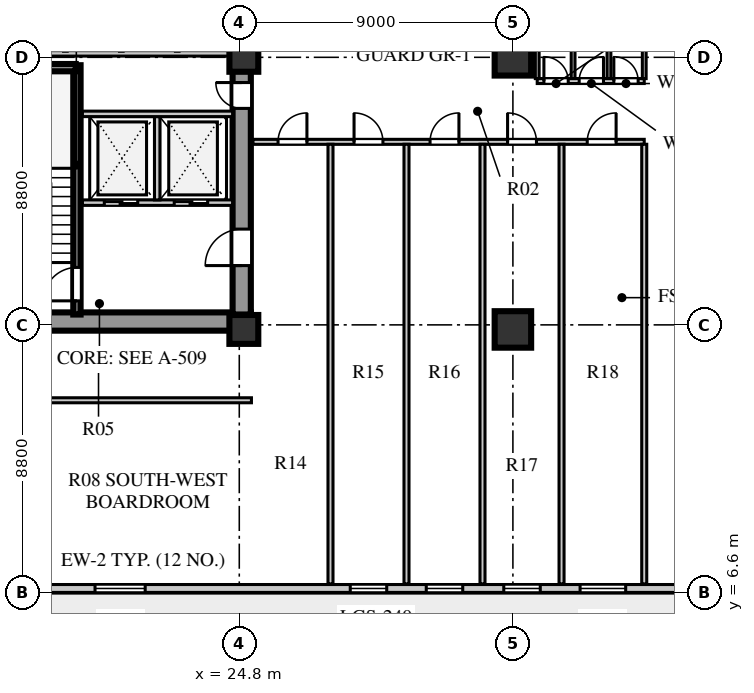
"""IFC4 building model, lengths in metres.
Left out: names, types, materials, properties, quantities, classifications, styles, units other than length and angle.
Written with IfcOpenShell. Run it as: python <this file> out.ifc"""

import sys

from ifc_helpers import new_model, si_unit, direction, frame, frame_2d, origin, origin_2d, place, context, subcontext, project, spatial, rectangle, extrude, element, fill, save


model = new_model("IFC4")
c1 = context("Model", 3, precision=1e-05, world=origin(), true_north=direction((0.0, 1.0)))
c2 = subcontext(c1, "Body", "Model", "MODEL_VIEW")
j1 = project(units=[si_unit("LENGTHUNIT", "METRE"), si_unit("PLANEANGLEUNIT", "RADIAN")], contexts=[c1])
p1 = place(None, origin())
s1 = spatial("IfcSite", under=j1, at=p1, CompositionType="ELEMENT")
p2 = place(p1, origin())
s2 = spatial("IfcBuilding", under=s1, at=p2, CompositionType="ELEMENT")
p3 = place(p2, frame((0.0, 0.0, 66.0)))
s3 = spatial("IfcBuildingStorey", under=s2, at=p3, CompositionType="ELEMENT", Elevation=66.0)
p4 = place(p3, frame((15.3, 15.51, 0.0), z_axis=(0.0, 0.0, 1.0), x_axis=(1.0, 0.0, 0.0)))
e1 = element("IfcWall", 1, at=p4, inside=s3, PredefinedType="SHEAR", context=c2, shape_type="SweptSolid", body=[
    extrude(rectangle(XDim=9.88, YDim=0.6, at=frame_2d((4.94, 0.0))), origin(), (0.0, 0.0, 1.0), 3.72),
])
p5 = place(p3, frame((24.88, 15.74, 0.0), z_axis=(0.0, 0.0, 1.0), x_axis=(0.0, 1.0, 0.0)))
e2 = element("IfcWall", 2, at=p5, inside=s3, PredefinedType="SHEAR", context=c2, shape_type="SweptSolid", body=[
    extrude(rectangle(XDim=25.76, YDim=0.6, at=frame_2d((12.88, 0.0))), origin(), (0.0, 0.0, 1.0), 3.72),
])
p6 = place(p5, frame((1.61, 0.0, 0.0)))
e3 = element("IfcOpeningElement", 3, at=p6, cuts=e2, PredefinedType="OPENING", context=c2, shape_type="SweptSolid", body=[
    extrude(rectangle(XDim=1.2, YDim=2.1, at=frame_2d((0.6, 1.05))), frame((0.0, 0.31, 0.0), z_axis=(0.0, -1.0, 0.0), x_axis=(1.0, 0.0, 0.0)), (0.0, 0.0, 1.0), 0.62),
])
p7 = place(p5, frame((6.78, 0.0, 0.0)))
e4 = element("IfcOpeningElement", 4, at=p7, cuts=e2, PredefinedType="OPENING", context=c2, shape_type="SweptSolid", body=[
    extrude(rectangle(XDim=0.85, YDim=2.06, at=frame_2d((0.425, 1.03))), frame((0.0, 0.31, 0.0), z_axis=(0.0, -1.0, 0.0), x_axis=(1.0, 0.0, 0.0)), (0.0, 0.0, 1.0), 0.62),
])
p8 = place(p5, frame((12.11, 0.0, 0.0)))
e5 = element("IfcOpeningElement", 5, at=p8, cuts=e2, PredefinedType="OPENING", context=c2, shape_type="SweptSolid", body=[
    extrude(rectangle(XDim=1.5, YDim=2.12, at=frame_2d((0.75, 1.06))), frame((0.0, 0.31, 0.0), z_axis=(0.0, -1.0, 0.0), x_axis=(1.0, 0.0, 0.0)), (0.0, 0.0, 1.0), 0.62),
])
p9 = place(p5, frame((20.11, 0.0, 0.0)))
e6 = element("IfcOpeningElement", 6, at=p9, cuts=e2, PredefinedType="OPENING", context=c2, shape_type="SweptSolid", body=[
    extrude(rectangle(XDim=1.2, YDim=2.12, at=frame_2d((0.6, 1.06))), frame((0.0, 0.31, 0.0), z_axis=(0.0, -1.0, 0.0), x_axis=(1.0, 0.0, 0.0)), (0.0, 0.0, 1.0), 0.62),
])
p10 = place(p5, frame((24.01, 0.0, 0.0)))
e7 = element("IfcOpeningElement", 7, at=p10, cuts=e2, PredefinedType="OPENING", context=c2, shape_type="SweptSolid", body=[
    extrude(rectangle(XDim=0.95, YDim=2.1, at=frame_2d((0.475, 1.05))), frame((0.0, 0.31, 0.0), z_axis=(0.0, -1.0, 0.0), x_axis=(1.0, 0.0, 0.0)), (0.0, 0.0, 1.0), 0.62),
])
for number, where, z_axis, x_axis in (
    (8, (24.95, 15.25, 0.0), (0.0, 0.0, 1.0), (1.0, 0.0, 0.0)),
    (9, (24.95, 24.2, 0.0), (0.0, 0.0, 1.0), (1.0, 0.0, 0.0)),
):
    element("IfcColumn", number, at=place(p3, frame(where, z_axis=z_axis, x_axis=x_axis)), inside=s3, PredefinedType="COLUMN", context=c2, shape_type="SweptSolid", body=[
        extrude(rectangle(XDim=0.95, YDim=0.95, at=origin_2d()), origin(), (0.0, 0.0, 1.0), 3.72),
    ])
for number, where, z_axis, x_axis in (
    (10, (33.8, 15.25, 0.0), (0.0, 0.0, 1.0), (1.0, 0.0, 0.0)),
    (11, (33.8, 24.2, 0.0), (0.0, 0.0, 1.0), (1.0, 0.0, 0.0)),
):
    element("IfcColumn", number, at=place(p3, frame(where, z_axis=z_axis, x_axis=x_axis)), inside=s3, PredefinedType="COLUMN", context=c2, shape_type="SweptSolid", body=[
        extrude(rectangle(XDim=1.2, YDim=1.2, at=origin_2d()), origin(), (0.0, 0.0, 1.0), 3.72),
    ])
p11 = place(p3, frame((12.3, 6.73, 0.0), z_axis=(0.0, 0.0, 1.0), x_axis=(1.0, 0.0, 0.0)))
e12 = element("IfcWall", 12, at=p11, inside=s3, PredefinedType="SOLIDWALL", context=c2, shape_type="SweptSolid", body=[
    extrude(rectangle(XDim=34.0, YDim=0.26, at=frame_2d((17.0, 0.0))), origin(), (0.0, 0.0, 1.0), 3.72),
])
p12 = place(p11, frame((0.95, 0.0, 0.0)))
e13 = element("IfcOpeningElement", 13, at=p12, cuts=e12, PredefinedType="OPENING", context=c2, shape_type="SweptSolid", body=[
    extrude(rectangle(XDim=1.0, YDim=2.05, at=frame_2d((0.5, 1.025))), frame((0.0, 0.14, 0.0), z_axis=(0.0, -1.0, 0.0), x_axis=(1.0, 0.0, 0.0)), (0.0, 0.0, 1.0), 0.28),
])
p13 = place(p11, frame((7.755, 0.0, 0.8)))
e14 = element("IfcOpeningElement", 14, at=p13, cuts=e12, PredefinedType="OPENING", context=c2, shape_type="SweptSolid", body=[
    extrude(rectangle(XDim=1.65, YDim=1.95, at=frame_2d((0.825, 0.975))), frame((0.0, 0.14, 0.0), z_axis=(0.0, -1.0, 0.0), x_axis=(1.0, 0.0, 0.0)), (0.0, 0.0, 1.0), 0.28),
])
p14 = place(p11, frame((16.15, 0.0, 0.8)))
e15 = element("IfcOpeningElement", 15, at=p14, cuts=e12, PredefinedType="OPENING", context=c2, shape_type="SweptSolid", body=[
    extrude(rectangle(XDim=1.2, YDim=1.75, at=frame_2d((0.6, 0.875))), frame((0.0, 0.14, 0.0), z_axis=(0.0, -1.0, 0.0), x_axis=(1.0, 0.0, 0.0)), (0.0, 0.0, 1.0), 0.28),
])
p15 = place(p11, frame((18.65, 0.0, 0.8)))
e16 = element("IfcOpeningElement", 16, at=p15, cuts=e12, PredefinedType="OPENING", context=c2, shape_type="SweptSolid", body=[
    extrude(rectangle(XDim=1.2, YDim=1.75, at=frame_2d((0.6, 0.875))), frame((0.0, 0.14, 0.0), z_axis=(0.0, -1.0, 0.0), x_axis=(1.0, 0.0, 0.0)), (0.0, 0.0, 1.0), 0.28),
])
p16 = place(p11, frame((21.2, 0.0, 0.8)))
e17 = element("IfcOpeningElement", 17, at=p16, cuts=e12, PredefinedType="OPENING", context=c2, shape_type="SweptSolid", body=[
    extrude(rectangle(XDim=1.2, YDim=1.75, at=frame_2d((0.6, 0.875))), frame((0.0, 0.14, 0.0), z_axis=(0.0, -1.0, 0.0), x_axis=(1.0, 0.0, 0.0)), (0.0, 0.0, 1.0), 0.28),
])
p17 = place(p11, frame((23.71, 0.0, 0.8)))
e18 = element("IfcOpeningElement", 18, at=p17, cuts=e12, PredefinedType="OPENING", context=c2, shape_type="SweptSolid", body=[
    extrude(rectangle(XDim=1.5, YDim=2.0, at=frame_2d((0.75, 1.0))), frame((0.0, 0.14, 0.0), z_axis=(0.0, -1.0, 0.0), x_axis=(1.0, 0.0, 0.0)), (0.0, 0.0, 1.0), 0.28),
])
p18 = place(p11, frame((29.255, 0.0, 0.8)))
e19 = element("IfcOpeningElement", 19, at=p18, cuts=e12, PredefinedType="OPENING", context=c2, shape_type="SweptSolid", body=[
    extrude(rectangle(XDim=1.2, YDim=1.75, at=frame_2d((0.6, 0.875))), frame((0.0, 0.14, 0.0), z_axis=(0.0, -1.0, 0.0), x_axis=(1.0, 0.0, 0.0)), (0.0, 0.0, 1.0), 0.28),
])
p19 = place(p3, frame((19.46, 15.74, 0.0), z_axis=(0.0, 0.0, 1.0), x_axis=(0.0, 1.0, 0.0)))
e20 = element("IfcWall", 20, at=p19, inside=s3, PredefinedType="SHEAR", context=c2, shape_type="SweptSolid", body=[
    extrude(rectangle(XDim=8.2, YDim=0.24, at=frame_2d((4.1, 0.0))), origin(), (0.0, 0.0, 1.0), 4.0),
])
p20 = place(p19, frame((0.45, 0.0, 0.0)))
e21 = element("IfcOpeningElement", 21, at=p20, cuts=e20, PredefinedType="OPENING", context=c2, shape_type="SweptSolid", body=[
    extrude(rectangle(XDim=1.1, YDim=2.1, at=frame_2d((0.55, 1.05))), frame((0.0, 0.13, 0.0), z_axis=(0.0, -1.0, 0.0), x_axis=(1.0, 0.0, 0.0)), (0.0, 0.0, 1.0), 0.26),
])
p21 = place(p3, frame((15.9, 23.86, 0.0), z_axis=(0.0, 0.0, 1.0), x_axis=(1.0, 0.0, 0.0)))
e22 = element("IfcWall", 22, at=p21, inside=s3, PredefinedType="SHEAR", context=c2, shape_type="SweptSolid", body=[
    extrude(rectangle(XDim=3.52, YDim=0.24, at=frame_2d((1.76, 0.0))), origin(), (0.0, 0.0, 1.0), 4.0),
])
p22 = place(p3, frame((19.64, 19.42, 0.0), z_axis=(0.0, 0.0, 1.0), x_axis=(1.0, 0.0, 0.0)))
e23 = element("IfcWall", 23, at=p22, inside=s3, PredefinedType="SOLIDWALL", context=c2, shape_type="SweptSolid", body=[
    extrude(rectangle(XDim=4.94, YDim=0.18, at=frame_2d((2.47, 0.0))), origin(), (0.0, 0.0, 1.0), 3.72),
])
p23 = place(p22, frame((0.72, 0.0, 0.0)))
e24 = element("IfcOpeningElement", 24, at=p23, cuts=e23, PredefinedType="OPENING", context=c2, shape_type="SweptSolid", body=[
    extrude(rectangle(XDim=1.1, YDim=2.1, at=frame_2d((0.55, 1.05))), frame((0.0, 0.1, 0.0), z_axis=(0.0, -1.0, 0.0), x_axis=(1.0, 0.0, 0.0)), (0.0, 0.0, 1.0), 0.2),
])
p24 = place(p22, frame((3.02, 0.0, 0.0)))
e25 = element("IfcOpeningElement", 25, at=p24, cuts=e23, PredefinedType="OPENING", context=c2, shape_type="SweptSolid", body=[
    extrude(rectangle(XDim=1.1, YDim=2.1, at=frame_2d((0.55, 1.05))), frame((0.0, 0.1, 0.0), z_axis=(0.0, -1.0, 0.0), x_axis=(1.0, 0.0, 0.0)), (0.0, 0.0, 1.0), 0.2),
])
p25 = place(p3, frame((22.1, 19.51, 0.0), z_axis=(0.0, 0.0, 1.0), x_axis=(0.0, 1.0, 0.0)))
e26 = element("IfcWall", 26, at=p25, inside=s3, PredefinedType="SOLIDWALL", context=c2, shape_type="SweptSolid", body=[
    extrude(rectangle(XDim=2.74, YDim=0.18, at=frame_2d((1.37, 0.0))), origin(), (0.0, 0.0, 1.0), 3.72),
])
p26 = place(p3, frame((19.64, 22.34, 0.0), z_axis=(0.0, 0.0, 1.0), x_axis=(1.0, 0.0, 0.0)))
e27 = element("IfcWall", 27, at=p26, inside=s3, PredefinedType="SOLIDWALL", context=c2, shape_type="SweptSolid", body=[
    extrude(rectangle(XDim=4.94, YDim=0.18, at=frame_2d((2.47, 0.0))), origin(), (0.0, 0.0, 1.0), 3.72),
])
p27 = place(p3, frame((15.9, 24.33, 0.0), z_axis=(0.0, 0.0, 1.0), x_axis=(1.0, 0.0, 0.0)))
e28 = element("IfcWall", 28, at=p27, inside=s3, PredefinedType="SOLIDWALL", context=c2, shape_type="SweptSolid", body=[
    extrude(rectangle(XDim=8.68, YDim=0.18, at=frame_2d((4.34, 0.0))), origin(), (0.0, 0.0, 1.0), 3.02),
])
p28 = place(p3, frame((25.25, 21.42, 0.0), z_axis=(0.0, 0.0, 1.0), x_axis=(1.0, 0.0, 0.0)))
e29 = element("IfcWall", 29, at=p28, inside=s3, PredefinedType="PARTITIONING", context=c2, shape_type="SweptSolid", body=[
    extrude(rectangle(XDim=12.87, YDim=0.165, at=frame_2d((6.435, 0.0))), origin(), (0.0, 0.0, 1.0), 3.32),
])
p29 = place(p28, frame((0.825, 0.0, 0.0)))
e30 = element("IfcOpeningElement", 30, at=p29, cuts=e29, PredefinedType="OPENING", context=c2, shape_type="SweptSolid", body=[
    extrude(rectangle(XDim=0.95, YDim=2.08, at=frame_2d((0.475, 1.04))), frame((0.0, 0.093, 0.0), z_axis=(0.0, -1.0, 0.0), x_axis=(1.0, 0.0, 0.0)), (0.0, 0.0, 1.0), 0.185),
])
p30 = place(p28, frame((3.325, 0.0, 0.0)))
e31 = element("IfcOpeningElement", 31, at=p30, cuts=e29, PredefinedType="OPENING", context=c2, shape_type="SweptSolid", body=[
    extrude(rectangle(XDim=0.95, YDim=2.08, at=frame_2d((0.475, 1.04))), frame((0.0, 0.093, 0.0), z_axis=(0.0, -1.0, 0.0), x_axis=(1.0, 0.0, 0.0)), (0.0, 0.0, 1.0), 0.185),
])
p31 = place(p28, frame((5.825, 0.0, 0.0)))
e32 = element("IfcOpeningElement", 32, at=p31, cuts=e29, PredefinedType="OPENING", context=c2, shape_type="SweptSolid", body=[
    extrude(rectangle(XDim=0.95, YDim=2.08, at=frame_2d((0.475, 1.04))), frame((0.0, 0.093, 0.0), z_axis=(0.0, -1.0, 0.0), x_axis=(1.0, 0.0, 0.0)), (0.0, 0.0, 1.0), 0.185),
])
p32 = place(p28, frame((8.375, 0.0, 0.0)))
e33 = element("IfcOpeningElement", 33, at=p32, cuts=e29, PredefinedType="OPENING", context=c2, shape_type="SweptSolid", body=[
    extrude(rectangle(XDim=0.95, YDim=2.08, at=frame_2d((0.475, 1.04))), frame((0.0, 0.093, 0.0), z_axis=(0.0, -1.0, 0.0), x_axis=(1.0, 0.0, 0.0)), (0.0, 0.0, 1.0), 0.185),
])
p33 = place(p28, frame((10.995, 0.0, 0.0)))
e34 = element("IfcOpeningElement", 34, at=p33, cuts=e29, PredefinedType="OPENING", context=c2, shape_type="SweptSolid", body=[
    extrude(rectangle(XDim=0.95, YDim=2.08, at=frame_2d((0.475, 1.04))), frame((0.0, 0.093, 0.0), z_axis=(0.0, -1.0, 0.0), x_axis=(1.0, 0.0, 0.0)), (0.0, 0.0, 1.0), 0.185),
])
p34 = place(p3, frame((38.12, 6.88, 0.0), z_axis=(0.0, 0.0, 1.0), x_axis=(0.0, 1.0, 0.0)))
e35 = element("IfcWall", 35, at=p34, inside=s3, PredefinedType="PARTITIONING", context=c2, shape_type="SweptSolid", body=[
    extrude(rectangle(XDim=14.46, YDim=0.165, at=frame_2d((7.23, 0.0))), origin(), (0.0, 0.0, 1.0), 3.72),
])
p35 = place(p3, frame((34.6, 23.42, 0.0), z_axis=(0.0, 0.0, 1.0), x_axis=(1.0, 0.0, 0.0)))
e36 = element("IfcWall", 36, at=p35, inside=s3, PredefinedType="PARTITIONING", context=c2, shape_type="SweptSolid", body=[
    extrude(rectangle(XDim=3.52, YDim=0.165, at=frame_2d((1.76, 0.0))), origin(), (0.0, 0.0, 1.0), 3.72),
])
p36 = place(p35, frame((0.22, 0.0, 0.0)))
e37 = element("IfcOpeningElement", 37, at=p36, cuts=e36, PredefinedType="OPENING", context=c2, shape_type="SweptSolid", body=[
    extrude(rectangle(XDim=0.8, YDim=2.05, at=frame_2d((0.4, 1.025))), frame((0.0, 0.093, 0.0), z_axis=(0.0, -1.0, 0.0), x_axis=(1.0, 0.0, 0.0)), (0.0, 0.0, 1.0), 0.185),
])
p37 = place(p35, frame((1.38, 0.0, 0.0)))
e38 = element("IfcOpeningElement", 38, at=p37, cuts=e36, PredefinedType="OPENING", context=c2, shape_type="SweptSolid", body=[
    extrude(rectangle(XDim=0.8, YDim=2.05, at=frame_2d((0.4, 1.025))), frame((0.0, 0.093, 0.0), z_axis=(0.0, -1.0, 0.0), x_axis=(1.0, 0.0, 0.0)), (0.0, 0.0, 1.0), 0.185),
])
p38 = place(p35, frame((2.52, 0.0, 0.0)))
e39 = element("IfcOpeningElement", 39, at=p38, cuts=e36, PredefinedType="OPENING", context=c2, shape_type="SweptSolid", body=[
    extrude(rectangle(XDim=0.8, YDim=2.05, at=frame_2d((0.4, 1.025))), frame((0.0, 0.093, 0.0), z_axis=(0.0, -1.0, 0.0), x_axis=(1.0, 0.0, 0.0)), (0.0, 0.0, 1.0), 0.185),
])
p39 = place(p3, frame((10.5, 12.92, 0.0), z_axis=(0.0, 0.0, 1.0), x_axis=(1.0, 0.0, 0.0)))
e40 = element("IfcWall", 40, at=p39, inside=s3, PredefinedType="PARTITIONING", context=c2, shape_type="SweptSolid", body=[
    extrude(rectangle(XDim=14.7, YDim=0.165, at=frame_2d((7.35, 0.0))), origin(), (0.0, 0.0, 1.0), 3.72),
])
p40 = place(p39, frame((6.2, 0.0, 0.0)))
e41 = element("IfcOpeningElement", 41, at=p40, cuts=e40, PredefinedType="OPENING", context=c2, shape_type="SweptSolid", body=[
    extrude(rectangle(XDim=1.0, YDim=2.08, at=frame_2d((0.5, 1.04))), frame((0.0, 0.093, 0.0), z_axis=(0.0, -1.0, 0.0), x_axis=(1.0, 0.0, 0.0)), (0.0, 0.0, 1.0), 0.185),
])
for number, where, z_axis, x_axis in (
    (42, (34.6, 23.5, 0.0), (0.0, 0.0, 1.0), (0.0, 1.0, 0.0)),
    (43, (38.12, 23.5, 0.0), (0.0, 0.0, 1.0), (0.0, 1.0, 0.0)),
    (44, (35.78, 23.5, 0.0), (0.0, 0.0, 1.0), (0.0, 1.0, 0.0)),
    (45, (36.96, 23.5, 0.0), (0.0, 0.0, 1.0), (0.0, 1.0, 0.0)),
):
    element("IfcWall", number, at=place(p3, frame(where, z_axis=z_axis, x_axis=x_axis)), inside=s3, PredefinedType="PLUMBINGWALL", context=c2, shape_type="SweptSolid", body=[
        extrude(rectangle(XDim=3.62, YDim=0.125, at=frame_2d((1.81, 0.0))), origin(), (0.0, 0.0, 1.0), 3.72),
    ])
for number, where, z_axis, x_axis in (
    (46, (27.8, 6.88, 0.0), (0.0, 0.0, 1.0), (0.0, 1.0, 0.0)),
    (47, (30.3, 6.88, 0.0), (0.0, 0.0, 1.0), (0.0, 1.0, 0.0)),
    (48, (32.8, 6.88, 0.0), (0.0, 0.0, 1.0), (0.0, 1.0, 0.0)),
    (49, (35.4, 6.88, 0.0), (0.0, 0.0, 1.0), (0.0, 1.0, 0.0)),
):
    element("IfcWall", number, at=place(p3, frame(where, z_axis=z_axis, x_axis=x_axis)), inside=s3, PredefinedType="PARTITIONING", context=c2, shape_type="SweptSolid", body=[
        extrude(rectangle(XDim=14.46, YDim=0.165, at=frame_2d((7.23, 0.0))), origin(), (0.0, 0.0, 1.0), 3.72),
    ])
p41 = place(p13, origin())
e50 = element("IfcWindow", 50, at=p41, inside=s3, PartitioningType="SINGLE_PANEL", PredefinedType="WINDOW", context=c2, shape_type="SweptSolid", body=[
    extrude(rectangle(XDim=1.65, YDim=1.95, at=frame_2d((0.825, 0.975))), frame((0.0, 0.03, 0.0), z_axis=(0.0, -1.0, 0.0), x_axis=(1.0, 0.0, 0.0)), (0.0, 0.0, 1.0), 0.06),
])
fill(e14, e50)
p42 = place(p14, origin())
e51 = element("IfcWindow", 51, at=p42, inside=s3, PartitioningType="SINGLE_PANEL", PredefinedType="WINDOW", context=c2, shape_type="SweptSolid", body=[
    extrude(rectangle(XDim=1.2, YDim=1.75, at=frame_2d((0.6, 0.875))), frame((0.0, 0.03, 0.0), z_axis=(0.0, -1.0, 0.0), x_axis=(1.0, 0.0, 0.0)), (0.0, 0.0, 1.0), 0.06),
])
fill(e15, e51)
p43 = place(p15, origin())
e52 = element("IfcWindow", 52, at=p43, inside=s3, PartitioningType="SINGLE_PANEL", PredefinedType="WINDOW", context=c2, shape_type="SweptSolid", body=[
    extrude(rectangle(XDim=1.2, YDim=1.75, at=frame_2d((0.6, 0.875))), frame((0.0, 0.03, 0.0), z_axis=(0.0, -1.0, 0.0), x_axis=(1.0, 0.0, 0.0)), (0.0, 0.0, 1.0), 0.06),
])
fill(e16, e52)
p44 = place(p16, origin())
e53 = element("IfcWindow", 53, at=p44, inside=s3, PartitioningType="SINGLE_PANEL", PredefinedType="WINDOW", context=c2, shape_type="SweptSolid", body=[
    extrude(rectangle(XDim=1.2, YDim=1.75, at=frame_2d((0.6, 0.875))), frame((0.0, 0.03, 0.0), z_axis=(0.0, -1.0, 0.0), x_axis=(1.0, 0.0, 0.0)), (0.0, 0.0, 1.0), 0.06),
])
fill(e17, e53)
p45 = place(p17, origin())
e54 = element("IfcWindow", 54, at=p45, inside=s3, PartitioningType="SINGLE_PANEL", PredefinedType="WINDOW", context=c2, shape_type="SweptSolid", body=[
    extrude(rectangle(XDim=1.5, YDim=2.0, at=frame_2d((0.75, 1.0))), frame((0.0, 0.03, 0.0), z_axis=(0.0, -1.0, 0.0), x_axis=(1.0, 0.0, 0.0)), (0.0, 0.0, 1.0), 0.06),
])
fill(e18, e54)
p46 = place(p20, origin())
e55 = element("IfcDoor", 55, at=p46, inside=s3, OperationType="SINGLE_SWING_LEFT", PredefinedType="DOOR", context=c2, shape_type="SweptSolid", body=[
    extrude(rectangle(XDim=1.1, YDim=2.1, at=frame_2d((0.55, 1.05))), frame((0.0, 0.025, 0.0), z_axis=(0.0, -1.0, 0.0), x_axis=(1.0, 0.0, 0.0)), (0.0, 0.0, 1.0), 0.05),
])
fill(e21, e55)
p47 = place(p23, origin())
e56 = element("IfcDoor", 56, at=p47, inside=s3, OperationType="DOUBLE_DOOR_SLIDING", PredefinedType="DOOR", context=c2, shape_type="SweptSolid", body=[
    extrude(rectangle(XDim=1.1, YDim=2.1, at=frame_2d((0.55, 1.05))), frame((0.0, 0.025, 0.0), z_axis=(0.0, -1.0, 0.0), x_axis=(1.0, 0.0, 0.0)), (0.0, 0.0, 1.0), 0.05),
])
fill(e24, e56)
p48 = place(p24, origin())
e57 = element("IfcDoor", 57, at=p48, inside=s3, OperationType="DOUBLE_DOOR_SLIDING", PredefinedType="DOOR", context=c2, shape_type="SweptSolid", body=[
    extrude(rectangle(XDim=1.1, YDim=2.1, at=frame_2d((0.55, 1.05))), frame((0.0, 0.025, 0.0), z_axis=(0.0, -1.0, 0.0), x_axis=(1.0, 0.0, 0.0)), (0.0, 0.0, 1.0), 0.05),
])
fill(e25, e57)
p49 = place(p6, frame((1.2, 0.0, 0.0), z_axis=(0.0, 0.0, 1.0), x_axis=(-1.0, 0.0, 0.0)))
e58 = element("IfcDoor", 58, at=p49, inside=s3, OperationType="SINGLE_SWING_RIGHT", PredefinedType="DOOR", context=c2, shape_type="SweptSolid", body=[
    extrude(rectangle(XDim=1.2, YDim=2.1, at=frame_2d((0.6, 1.05))), frame((0.0, 0.025, 0.0), z_axis=(0.0, -1.0, 0.0), x_axis=(1.0, 0.0, 0.0)), (0.0, 0.0, 1.0), 0.05),
])
fill(e3, e58)
p50 = place(p7, frame((0.85, 0.0, 0.0), z_axis=(0.0, 0.0, 1.0), x_axis=(-1.0, 0.0, 0.0)))
e59 = element("IfcDoor", 59, at=p50, inside=s3, OperationType="SINGLE_SWING_LEFT", PredefinedType="DOOR", context=c2, shape_type="SweptSolid", body=[
    extrude(rectangle(XDim=0.85, YDim=2.06, at=frame_2d((0.425, 1.03))), frame((0.0, 0.025, 0.0), z_axis=(0.0, -1.0, 0.0), x_axis=(1.0, 0.0, 0.0)), (0.0, 0.0, 1.0), 0.05),
])
fill(e4, e59)
p51 = place(p36, origin())
e60 = element("IfcDoor", 60, at=p51, inside=s3, OperationType="SINGLE_SWING_LEFT", PredefinedType="DOOR", context=c2, shape_type="SweptSolid", body=[
    extrude(rectangle(XDim=0.8, YDim=2.05, at=frame_2d((0.4, 1.025))), frame((0.0, 0.025, 0.0), z_axis=(0.0, -1.0, 0.0), x_axis=(1.0, 0.0, 0.0)), (0.0, 0.0, 1.0), 0.05),
])
fill(e37, e60)
p52 = place(p37, origin())
e61 = element("IfcDoor", 61, at=p52, inside=s3, OperationType="SINGLE_SWING_RIGHT", PredefinedType="DOOR", context=c2, shape_type="SweptSolid", body=[
    extrude(rectangle(XDim=0.8, YDim=2.05, at=frame_2d((0.4, 1.025))), frame((0.0, 0.025, 0.0), z_axis=(0.0, -1.0, 0.0), x_axis=(1.0, 0.0, 0.0)), (0.0, 0.0, 1.0), 0.05),
])
fill(e38, e61)
p53 = place(p38, origin())
e62 = element("IfcDoor", 62, at=p53, inside=s3, OperationType="SINGLE_SWING_LEFT", PredefinedType="DOOR", context=c2, shape_type="SweptSolid", body=[
    extrude(rectangle(XDim=0.8, YDim=2.05, at=frame_2d((0.4, 1.025))), frame((0.0, 0.025, 0.0), z_axis=(0.0, -1.0, 0.0), x_axis=(1.0, 0.0, 0.0)), (0.0, 0.0, 1.0), 0.05),
])
fill(e39, e62)
p54 = place(p29, frame((0.95, 0.0, 0.0), z_axis=(0.0, 0.0, 1.0), x_axis=(-1.0, 0.0, 0.0)))
e63 = element("IfcDoor", 63, at=p54, inside=s3, OperationType="SINGLE_SWING_LEFT", PredefinedType="DOOR", context=c2, shape_type="SweptSolid", body=[
    extrude(rectangle(XDim=0.95, YDim=2.08, at=frame_2d((0.475, 1.04))), frame((0.0, 0.025, 0.0), z_axis=(0.0, -1.0, 0.0), x_axis=(1.0, 0.0, 0.0)), (0.0, 0.0, 1.0), 0.05),
])
fill(e30, e63)
p55 = place(p30, frame((0.95, 0.0, 0.0), z_axis=(0.0, 0.0, 1.0), x_axis=(-1.0, 0.0, 0.0)))
e64 = element("IfcDoor", 64, at=p55, inside=s3, OperationType="SINGLE_SWING_RIGHT", PredefinedType="DOOR", context=c2, shape_type="SweptSolid", body=[
    extrude(rectangle(XDim=0.95, YDim=2.08, at=frame_2d((0.475, 1.04))), frame((0.0, 0.025, 0.0), z_axis=(0.0, -1.0, 0.0), x_axis=(1.0, 0.0, 0.0)), (0.0, 0.0, 1.0), 0.05),
])
fill(e31, e64)
p56 = place(p31, frame((0.95, 0.0, 0.0), z_axis=(0.0, 0.0, 1.0), x_axis=(-1.0, 0.0, 0.0)))
e65 = element("IfcDoor", 65, at=p56, inside=s3, OperationType="SINGLE_SWING_LEFT", PredefinedType="DOOR", context=c2, shape_type="SweptSolid", body=[
    extrude(rectangle(XDim=0.95, YDim=2.08, at=frame_2d((0.475, 1.04))), frame((0.0, 0.025, 0.0), z_axis=(0.0, -1.0, 0.0), x_axis=(1.0, 0.0, 0.0)), (0.0, 0.0, 1.0), 0.05),
])
fill(e32, e65)
p57 = place(p32, frame((0.95, 0.0, 0.0), z_axis=(0.0, 0.0, 1.0), x_axis=(-1.0, 0.0, 0.0)))
e66 = element("IfcDoor", 66, at=p57, inside=s3, OperationType="SINGLE_SWING_RIGHT", PredefinedType="DOOR", context=c2, shape_type="SweptSolid", body=[
    extrude(rectangle(XDim=0.95, YDim=2.08, at=frame_2d((0.475, 1.04))), frame((0.0, 0.025, 0.0), z_axis=(0.0, -1.0, 0.0), x_axis=(1.0, 0.0, 0.0)), (0.0, 0.0, 1.0), 0.05),
])
fill(e33, e66)
p58 = place(p33, frame((0.95, 0.0, 0.0), z_axis=(0.0, 0.0, 1.0), x_axis=(-1.0, 0.0, 0.0)))
e67 = element("IfcDoor", 67, at=p58, inside=s3, OperationType="SINGLE_SWING_LEFT", PredefinedType="DOOR", context=c2, shape_type="SweptSolid", body=[
    extrude(rectangle(XDim=0.95, YDim=2.08, at=frame_2d((0.475, 1.04))), frame((0.0, 0.025, 0.0), z_axis=(0.0, -1.0, 0.0), x_axis=(1.0, 0.0, 0.0)), (0.0, 0.0, 1.0), 0.05),
])
fill(e34, e67)
save(model, sys.argv[1])
